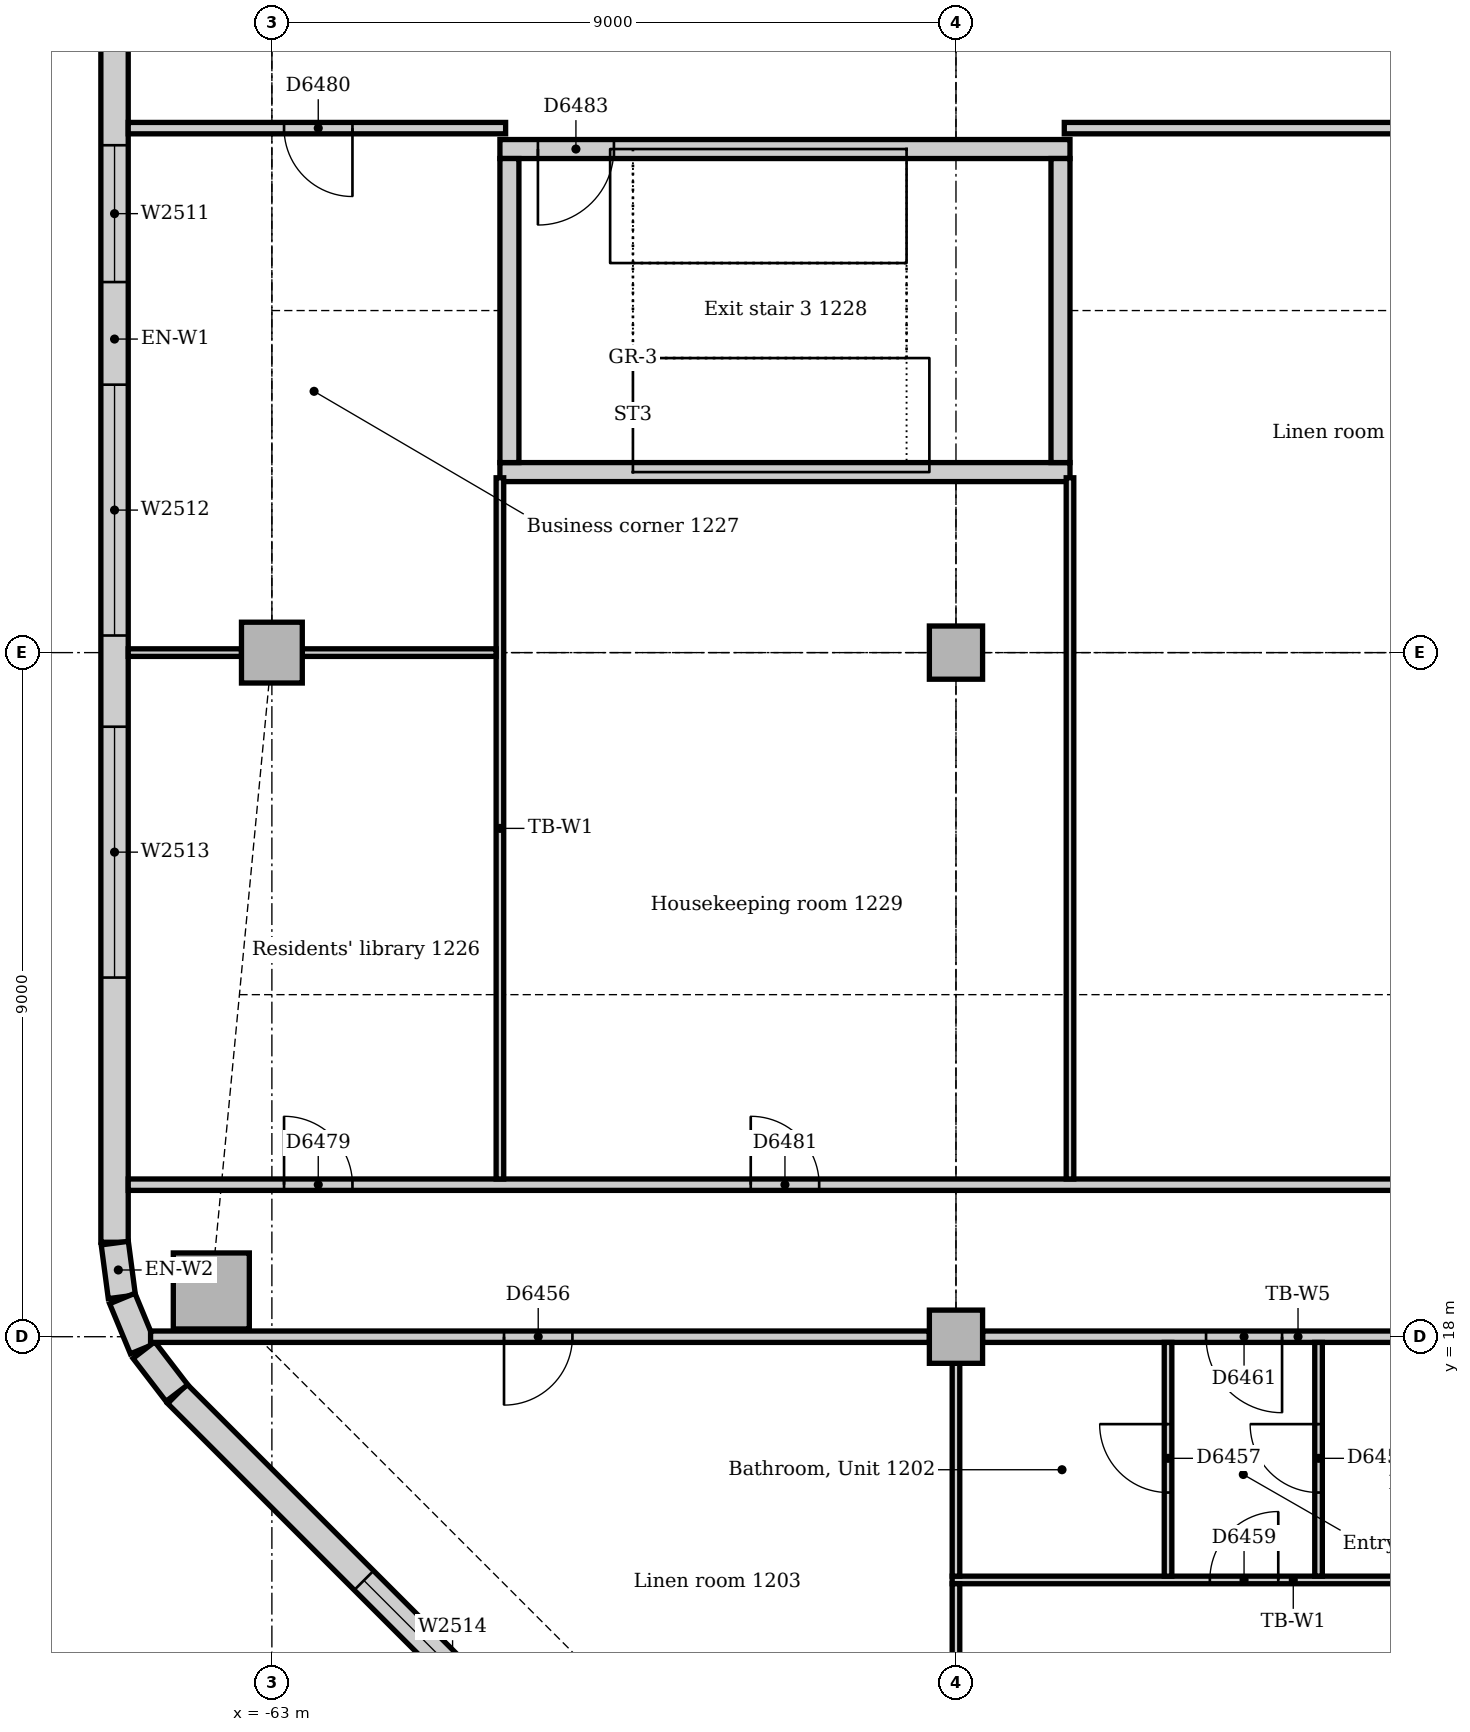
"""IFC4 building model, lengths in metres.
Left out: names, types, materials, properties, quantities, classifications, styles, units other than length and angle.
Written with IfcOpenShell. Run it as: python <this file> out.ifc"""

import sys

from ifc_helpers import new_model, si_unit, direction, frame, frame_2d, origin, origin_2d, place, context, subcontext, project, spatial, rectangle, extrude, element, fill, save


model = new_model("IFC4")
c1 = context("Model", 3, precision=1e-05, world=origin(), true_north=direction((0.0, 1.0)))
c2 = subcontext(c1, "Body", "Model", "MODEL_VIEW")
j1 = project(units=[si_unit("LENGTHUNIT", "METRE"), si_unit("PLANEANGLEUNIT", "RADIAN")], contexts=[c1])
p1 = place(None, origin())
s1 = spatial("IfcSite", under=j1, at=p1, CompositionType="ELEMENT")
p2 = place(p1, origin())
s2 = spatial("IfcBuilding", under=s1, at=p2, CompositionType="ELEMENT")
p3 = place(p2, frame((0.0, 0.0, 55.0)))
s3 = spatial("IfcBuildingStorey", under=s2, at=p3, CompositionType="ELEMENT", Elevation=55.0)
p4 = place(p3, frame((-60.0, 29.375, 0.0), z_axis=(0.0, 0.0, 1.0), x_axis=(1.0, 0.0, 0.0)))
e1 = element("IfcWall", 1, at=p4, inside=s3, PredefinedType="SOLIDWALL", context=c2, shape_type="SweptSolid", body=[
    extrude(rectangle(XDim=7.5, YDim=0.25, at=frame_2d((3.75, 0.0))), origin(), (0.0, 0.0, 1.0), 4.0),
])
p5 = place(p3, frame((-52.5, 33.625, 0.0), z_axis=(0.0, 0.0, 1.0), x_axis=(-1.0, 0.0, 0.0)))
e2 = element("IfcWall", 2, at=p5, inside=s3, PredefinedType="SOLIDWALL", context=c2, shape_type="SweptSolid", body=[
    extrude(rectangle(XDim=7.5, YDim=0.25, at=frame_2d((3.75, 0.0))), origin(), (0.0, 0.0, 1.0), 4.0),
])
p6 = place(p5, frame((6.0, 0.0, 0.0)))
e3 = element("IfcOpeningElement", 3, at=p6, cuts=e2, PredefinedType="OPENING", context=c2, shape_type="SweptSolid", body=[
    extrude(rectangle(XDim=1.0, YDim=2.1, at=frame_2d((0.5, 1.05))), frame((0.0, 0.135, 0.0), z_axis=(0.0, -1.0, 0.0), x_axis=(1.0, 0.0, 0.0)), (0.0, 0.0, 1.0), 0.27),
])
for number, where, z_axis, x_axis in (
    (4, (-52.625, 29.5, 0.0), (0.0, 0.0, 1.0), (0.0, 1.0, 0.0)),
    (5, (-59.875, 33.5, 0.0), (0.0, 0.0, 1.0), (0.0, -1.0, 0.0)),
):
    element("IfcWall", number, at=place(p3, frame(where, z_axis=z_axis, x_axis=x_axis)), inside=s3, PredefinedType="SOLIDWALL", context=c2, shape_type="SweptSolid", body=[
        extrude(rectangle(XDim=4.0, YDim=0.25, at=frame_2d((2.0, 0.0))), origin(), (0.0, 0.0, 1.0), 4.0),
    ])
p7 = place(p3, frame((-63.797, 18.602, 0.0), z_axis=(0.0, 0.0, 1.0), x_axis=(1.0, 0.0, 0.0)))
e6 = element("IfcColumn", 6, at=p7, inside=s3, PredefinedType="COLUMN", context=c2, shape_type="SweptSolid", body=[
    extrude(rectangle(XDim=1.0, YDim=1.0, at=origin_2d()), origin(), (0.0, 0.0, 1.0), 3.85),
])
p8 = place(p3, frame((-63.0, 27.0, 0.0), z_axis=(0.0, 0.0, 1.0), x_axis=(1.0, 0.0, 0.0)))
e7 = element("IfcColumn", 7, at=p8, inside=s3, PredefinedType="COLUMN", context=c2, shape_type="SweptSolid", body=[
    extrude(rectangle(XDim=0.8, YDim=0.8, at=origin_2d()), origin(), (0.0, 0.0, 1.0), 3.85),
])
for number, where, z_axis, x_axis in (
    (8, (-54.0, 18.0, 0.0), (0.0, 0.0, 1.0), (1.0, 0.0, 0.0)),
    (9, (-54.0, 27.0, 0.0), (0.0, 0.0, 1.0), (1.0, 0.0, 0.0)),
):
    element("IfcColumn", number, at=place(p3, frame(where, z_axis=z_axis, x_axis=x_axis)), inside=s3, PredefinedType="COLUMN", context=c2, shape_type="SweptSolid", body=[
        extrude(rectangle(XDim=0.7, YDim=0.7, at=origin_2d()), origin(), (0.0, 0.0, 1.0), 3.85),
    ])
p9 = place(p3, frame((-65.07, 43.007, 0.0), z_axis=(0.0, 0.0, 1.0), x_axis=(0.0, -1.0, 0.0)))
e10 = element("IfcWall", 10, at=p9, inside=s3, PredefinedType="STANDARD", context=c2, shape_type="SweptSolid", body=[
    extrude(rectangle(XDim=23.765, YDim=0.36, at=frame_2d((11.882, 0.0))), origin(), (0.0, 0.0, 1.0), 3.85),
])
p10 = place(p9, frame((4.232, 0.0, 0.9)))
e11 = element("IfcOpeningElement", 11, at=p10, cuts=e10, PredefinedType="OPENING", context=c2, shape_type="SweptSolid", body=[
    extrude(rectangle(XDim=1.8, YDim=1.6, at=frame_2d((0.9, 0.8))), frame((0.0, 0.19, 0.0), z_axis=(0.0, -1.0, 0.0), x_axis=(1.0, 0.0, 0.0)), (0.0, 0.0, 1.0), 0.38),
])
p11 = place(p9, frame((9.332, 0.0, 0.9)))
e12 = element("IfcOpeningElement", 12, at=p11, cuts=e10, PredefinedType="OPENING", context=c2, shape_type="SweptSolid", body=[
    extrude(rectangle(XDim=1.8, YDim=1.6, at=frame_2d((0.9, 0.8))), frame((0.0, 0.19, 0.0), z_axis=(0.0, -1.0, 0.0), x_axis=(1.0, 0.0, 0.0)), (0.0, 0.0, 1.0), 0.38),
])
p12 = place(p9, frame((12.482, 0.0, 0.9)))
e13 = element("IfcOpeningElement", 13, at=p12, cuts=e10, PredefinedType="OPENING", context=c2, shape_type="SweptSolid", body=[
    extrude(rectangle(XDim=3.3, YDim=1.6, at=frame_2d((1.65, 0.8))), frame((0.0, 0.19, 0.0), z_axis=(0.0, -1.0, 0.0), x_axis=(1.0, 0.0, 0.0)), (0.0, 0.0, 1.0), 0.38),
])
p13 = place(p9, frame((16.982, 0.0, 0.9)))
e14 = element("IfcOpeningElement", 14, at=p13, cuts=e10, PredefinedType="OPENING", context=c2, shape_type="SweptSolid", body=[
    extrude(rectangle(XDim=3.3, YDim=1.6, at=frame_2d((1.65, 0.8))), frame((0.0, 0.19, 0.0), z_axis=(0.0, -1.0, 0.0), x_axis=(1.0, 0.0, 0.0)), (0.0, 0.0, 1.0), 0.38),
])
p14 = place(p3, frame((-64.244, 17.249, 0.0), z_axis=(0.0, 0.0, 1.0), x_axis=(0.707106781187, -0.707106781187, 0.0)))
e15 = element("IfcWall", 15, at=p14, inside=s3, PredefinedType="STANDARD", context=c2, shape_type="SweptSolid", body=[
    extrude(rectangle(XDim=10.243, YDim=0.36, at=frame_2d((5.121, 0.0))), origin(), (0.0, 0.0, 1.0), 3.85),
])
p15 = place(p14, frame((3.471, 0.0, 0.9)))
e16 = element("IfcOpeningElement", 16, at=p15, cuts=e15, PredefinedType="OPENING", context=c2, shape_type="SweptSolid", body=[
    extrude(rectangle(XDim=3.3, YDim=1.6, at=frame_2d((1.65, 0.8))), frame((0.0, 0.19, 0.0), z_axis=(0.0, -1.0, 0.0), x_axis=(1.0, 0.0, 0.0)), (0.0, 0.0, 1.0), 0.38),
])
for number, where, z_axis, x_axis in (
    (17, (-65.067, 19.231, 0.0), (0.0, 0.0, 1.0), (0.131, -0.991, 0.0)),
    (18, (-64.968, 18.503, 0.0), (0.0, 0.0, 1.0), (0.383, -0.924, 0.0)),
):
    element("IfcWall", number, at=place(p3, frame(where, z_axis=z_axis, x_axis=x_axis)), inside=s3, PredefinedType="STANDARD", context=c2, shape_type="SweptSolid", body=[
        extrude(rectangle(XDim=0.713, YDim=0.36, at=frame_2d((0.356, 0.0))), origin(), (0.0, 0.0, 1.0), 3.85),
    ])
p16 = place(p3, frame((-64.684, 17.825, 0.0), z_axis=(0.0, 0.0, 1.0), x_axis=(0.608802368033, -0.793321924995, 0.0)))
e19 = element("IfcWall", 19, at=p16, inside=s3, PredefinedType="STANDARD", context=c2, shape_type="SweptSolid", body=[
    extrude(rectangle(XDim=0.713, YDim=0.36, at=frame_2d((0.357, 0.0))), origin(), (0.0, 0.0, 1.0), 3.85),
])
p17 = place(p3, frame((-53.65, 18.0, 0.0), z_axis=(0.0, 0.0, 1.0), x_axis=(1.0, 0.0, 0.0)))
e20 = element("IfcWall", 20, at=p17, inside=s3, PredefinedType="PARTITIONING", context=c2, shape_type="SweptSolid", body=[
    extrude(rectangle(XDim=8.3, YDim=0.15, at=frame_2d((4.15, 0.0))), origin(), (0.0, 0.0, 1.0), 3.158),
])
p18 = place(p17, frame((2.94, 0.0, 0.0)))
e21 = element("IfcOpeningElement", 21, at=p18, cuts=e20, PredefinedType="OPENING", context=c2, shape_type="SweptSolid", body=[
    extrude(rectangle(XDim=1.0, YDim=2.1, at=frame_2d((0.5, 1.05))), frame((0.0, 0.085, 0.0), z_axis=(0.0, -1.0, 0.0), x_axis=(1.0, 0.0, 0.0)), (0.0, 0.0, 1.0), 0.17),
])
p19 = place(p3, frame((-64.596, 18.0, 0.0), z_axis=(0.0, 0.0, 1.0), x_axis=(1.0, 0.0, 0.0)))
e22 = element("IfcWall", 22, at=p19, inside=s3, PredefinedType="PARTITIONING", context=c2, shape_type="SweptSolid", body=[
    extrude(rectangle(XDim=10.246, YDim=0.15, at=frame_2d((5.123, 0.0))), origin(), (0.0, 0.0, 1.0), 3.158),
])
p20 = place(p19, frame((4.65, 0.0, 0.0)))
e23 = element("IfcOpeningElement", 23, at=p20, cuts=e22, PredefinedType="OPENING", context=c2, shape_type="SweptSolid", body=[
    extrude(rectangle(XDim=0.9, YDim=2.1, at=frame_2d((0.45, 1.05))), frame((0.0, 0.085, 0.0), z_axis=(0.0, -1.0, 0.0), x_axis=(1.0, 0.0, 0.0)), (0.0, 0.0, 1.0), 0.17),
])
p21 = place(p3, frame((-64.89, 20.0, 0.0), z_axis=(0.0, 0.0, 1.0), x_axis=(1.0, 0.0, 0.0)))
e24 = element("IfcWall", 24, at=p21, inside=s3, PredefinedType="PARTITIONING", context=c2, shape_type="SweptSolid", body=[
    extrude(rectangle(XDim=19.965, YDim=0.15, at=frame_2d((9.982, 0.0))), origin(), (0.0, 0.0, 1.0), 3.85),
])
p22 = place(p21, frame((2.05, 0.0, 0.0)))
e25 = element("IfcOpeningElement", 25, at=p22, cuts=e24, PredefinedType="OPENING", context=c2, shape_type="SweptSolid", body=[
    extrude(rectangle(XDim=0.9, YDim=2.1, at=frame_2d((0.45, 1.05))), frame((0.0, 0.085, 0.0), z_axis=(0.0, -1.0, 0.0), x_axis=(1.0, 0.0, 0.0)), (0.0, 0.0, 1.0), 0.17),
])
p23 = place(p21, frame((8.19, 0.0, 0.0)))
e26 = element("IfcOpeningElement", 26, at=p23, cuts=e24, PredefinedType="OPENING", context=c2, shape_type="SweptSolid", body=[
    extrude(rectangle(XDim=0.9, YDim=2.1, at=frame_2d((0.45, 1.05))), frame((0.0, 0.085, 0.0), z_axis=(0.0, -1.0, 0.0), x_axis=(1.0, 0.0, 0.0)), (0.0, 0.0, 1.0), 0.17),
])
p24 = place(p3, frame((-52.575, 33.9, 0.0), z_axis=(0.0, 0.0, 1.0), x_axis=(1.0, 0.0, 0.0)))
e27 = element("IfcWall", 27, at=p24, inside=s3, PredefinedType="PARTITIONING", context=c2, shape_type="SweptSolid", body=[
    extrude(rectangle(XDim=7.5, YDim=0.15, at=frame_2d((3.75, 0.0))), origin(), (0.0, 0.0, 1.0), 3.85),
])
p25 = place(p3, frame((-64.89, 33.9, 0.0), z_axis=(0.0, 0.0, 1.0), x_axis=(1.0, 0.0, 0.0)))
e28 = element("IfcWall", 28, at=p25, inside=s3, PredefinedType="PARTITIONING", context=c2, shape_type="SweptSolid", body=[
    extrude(rectangle(XDim=4.965, YDim=0.15, at=frame_2d((2.482, 0.0))), origin(), (0.0, 0.0, 1.0), 3.85),
])
p26 = place(p25, frame((2.05, 0.0, 0.0)))
e29 = element("IfcOpeningElement", 29, at=p26, cuts=e28, PredefinedType="OPENING", context=c2, shape_type="SweptSolid", body=[
    extrude(rectangle(XDim=0.9, YDim=2.1, at=frame_2d((0.45, 1.05))), frame((0.0, 0.085, 0.0), z_axis=(0.0, -1.0, 0.0), x_axis=(1.0, 0.0, 0.0)), (0.0, 0.0, 1.0), 0.17),
])
p27 = place(p3, frame((-54.05, 14.8, 0.0), z_axis=(0.0, 0.0, 1.0), x_axis=(1.0, 0.0, 0.0)))
e30 = element("IfcWall", 30, at=p27, inside=s3, PredefinedType="PARTITIONING", context=c2, shape_type="SweptSolid", body=[
    extrude(rectangle(XDim=8.975, YDim=0.1, at=frame_2d((4.487, 0.0))), origin(), (0.0, 0.0, 1.0), 3.85),
])
p28 = place(p27, frame((3.39, 0.0, 0.0)))
e31 = element("IfcOpeningElement", 31, at=p28, cuts=e30, PredefinedType="OPENING", context=c2, shape_type="SweptSolid", body=[
    extrude(rectangle(XDim=0.9, YDim=2.1, at=frame_2d((0.45, 1.05))), frame((0.0, 0.06, 0.0), z_axis=(0.0, -1.0, 0.0), x_axis=(1.0, 0.0, 0.0)), (0.0, 0.0, 1.0), 0.12),
])
for number, where, z_axis, x_axis in (
    (32, (-60.0, 20.075, 0.0), (0.0, 0.0, 1.0), (0.0, 1.0, 0.0)),
    (33, (-52.5, 20.075, 0.0), (0.0, 0.0, 1.0), (0.0, 1.0, 0.0)),
):
    element("IfcWall", number, at=place(p3, frame(where, z_axis=z_axis, x_axis=x_axis)), inside=s3, PredefinedType="PARTITIONING", context=c2, shape_type="SweptSolid", body=[
        extrude(rectangle(XDim=9.225, YDim=0.1, at=frame_2d((4.612, 0.0))), origin(), (0.0, 0.0, 1.0), 3.85),
    ])
p29 = place(p3, frame((-54.0, 9.36, 0.0), z_axis=(0.0, 0.0, 1.0), x_axis=(0.0, 1.0, 0.0)))
e34 = element("IfcWall", 34, at=p29, inside=s3, PredefinedType="PARTITIONING", context=c2, shape_type="SweptSolid", body=[
    extrude(rectangle(XDim=5.39, YDim=0.1, at=frame_2d((2.695, 0.0))), origin(), (0.0, 0.0, 1.0), 3.256),
])
p30 = place(p3, frame((-54.0, 14.85, 0.0), z_axis=(0.0, 0.0, 1.0), x_axis=(0.0, 1.0, 0.0)))
e35 = element("IfcWall", 35, at=p30, inside=s3, PredefinedType="PARTITIONING", context=c2, shape_type="SweptSolid", body=[
    extrude(rectangle(XDim=2.8, YDim=0.1, at=frame_2d((1.4, 0.0))), origin(), (0.0, 0.0, 1.0), 3.256),
])
p31 = place(p3, frame((-62.6, 27.0, 0.0), z_axis=(0.0, 0.0, 1.0), x_axis=(1.0, 0.0, 0.0)))
e36 = element("IfcWall", 36, at=p31, inside=s3, PredefinedType="PARTITIONING", context=c2, shape_type="SweptSolid", body=[
    extrude(rectangle(XDim=2.55, YDim=0.1, at=frame_2d((1.275, 0.0))), origin(), (0.0, 0.0, 1.0), 3.158),
])
p32 = place(p3, frame((-64.89, 27.0, 0.0), z_axis=(0.0, 0.0, 1.0), x_axis=(1.0, 0.0, 0.0)))
e37 = element("IfcWall", 37, at=p32, inside=s3, PredefinedType="PARTITIONING", context=c2, shape_type="SweptSolid", body=[
    extrude(rectangle(XDim=1.49, YDim=0.1, at=frame_2d((0.745, 0.0))), origin(), (0.0, 0.0, 1.0), 3.85),
])
p33 = place(p3, frame((-51.21, 14.85, 0.0), z_axis=(0.0, 0.0, 1.0), x_axis=(0.0, 1.0, 0.0)))
e38 = element("IfcWall", 38, at=p33, inside=s3, PredefinedType="PARTITIONING", context=c2, shape_type="SweptSolid", body=[
    extrude(rectangle(XDim=3.075, YDim=0.1, at=frame_2d((1.538, 0.0))), origin(), (0.0, 0.0, 1.0), 3.85),
])
p34 = place(p33, frame((1.1, 0.0, 0.0)))
e39 = element("IfcOpeningElement", 39, at=p34, cuts=e38, PredefinedType="OPENING", context=c2, shape_type="SweptSolid", body=[
    extrude(rectangle(XDim=0.9, YDim=2.1, at=frame_2d((0.45, 1.05))), frame((0.0, 0.06, 0.0), z_axis=(0.0, -1.0, 0.0), x_axis=(1.0, 0.0, 0.0)), (0.0, 0.0, 1.0), 0.12),
])
p35 = place(p3, frame((-49.23, 14.85, 0.0), z_axis=(0.0, 0.0, 1.0), x_axis=(0.0, 1.0, 0.0)))
e40 = element("IfcWall", 40, at=p35, inside=s3, PredefinedType="PARTITIONING", context=c2, shape_type="SweptSolid", body=[
    extrude(rectangle(XDim=3.075, YDim=0.1, at=frame_2d((1.538, 0.0))), origin(), (0.0, 0.0, 1.0), 3.85),
])
p36 = place(p35, frame((1.1, 0.0, 0.0)))
e41 = element("IfcOpeningElement", 41, at=p36, cuts=e40, PredefinedType="OPENING", context=c2, shape_type="SweptSolid", body=[
    extrude(rectangle(XDim=0.9, YDim=2.1, at=frame_2d((0.45, 1.05))), frame((0.0, 0.06, 0.0), z_axis=(0.0, -1.0, 0.0), x_axis=(1.0, 0.0, 0.0)), (0.0, 0.0, 1.0), 0.12),
])
p37 = place(p11, origin())
e42 = element("IfcWindow", 42, at=p37, inside=s3, PartitioningType="SINGLE_PANEL", PredefinedType="WINDOW", context=c2, shape_type="SweptSolid", body=[
    extrude(rectangle(XDim=1.8, YDim=1.6, at=frame_2d((0.9, 0.8))), frame((0.0, 0.13, 0.0), z_axis=(0.0, -1.0, 0.0), x_axis=(1.0, 0.0, 0.0)), (0.0, 0.0, 1.0), 0.06),
])
fill(e12, e42)
p38 = place(p12, origin())
e43 = element("IfcWindow", 43, at=p38, inside=s3, PartitioningType="SINGLE_PANEL", PredefinedType="WINDOW", context=c2, shape_type="SweptSolid", body=[
    extrude(rectangle(XDim=3.3, YDim=1.6, at=frame_2d((1.65, 0.8))), frame((0.0, 0.13, 0.0), z_axis=(0.0, -1.0, 0.0), x_axis=(1.0, 0.0, 0.0)), (0.0, 0.0, 1.0), 0.06),
])
fill(e13, e43)
p39 = place(p13, origin())
e44 = element("IfcWindow", 44, at=p39, inside=s3, PartitioningType="SINGLE_PANEL", PredefinedType="WINDOW", context=c2, shape_type="SweptSolid", body=[
    extrude(rectangle(XDim=3.3, YDim=1.6, at=frame_2d((1.65, 0.8))), frame((0.0, 0.13, 0.0), z_axis=(0.0, -1.0, 0.0), x_axis=(1.0, 0.0, 0.0)), (0.0, 0.0, 1.0), 0.06),
])
fill(e14, e44)
p40 = place(p15, origin())
e45 = element("IfcWindow", 45, at=p40, inside=s3, PartitioningType="SINGLE_PANEL", PredefinedType="WINDOW", context=c2, shape_type="SweptSolid", body=[
    extrude(rectangle(XDim=3.3, YDim=1.6, at=frame_2d((1.65, 0.8))), frame((0.0, 0.13, 0.0), z_axis=(0.0, -1.0, 0.0), x_axis=(1.0, 0.0, 0.0)), (0.0, 0.0, 1.0), 0.06),
])
fill(e16, e45)
p41 = place(p20, frame((0.9, 0.0, 0.0), z_axis=(0.0, 0.0, 1.0), x_axis=(-1.0, 0.0, 0.0)))
e46 = element("IfcDoor", 46, at=p41, inside=s3, OperationType="SINGLE_SWING_RIGHT", PredefinedType="DOOR", context=c2, shape_type="SweptSolid", body=[
    extrude(rectangle(XDim=0.9, YDim=2.1, at=frame_2d((0.45, 1.05))), frame((0.0, 0.025, 0.0), z_axis=(0.0, -1.0, 0.0), x_axis=(1.0, 0.0, 0.0)), (0.0, 0.0, 1.0), 0.05),
])
fill(e23, e46)
p42 = place(p34, origin())
e47 = element("IfcDoor", 47, at=p42, inside=s3, OperationType="SINGLE_SWING_RIGHT", PredefinedType="DOOR", context=c2, shape_type="SweptSolid", body=[
    extrude(rectangle(XDim=0.9, YDim=2.1, at=frame_2d((0.45, 1.05))), frame((0.0, 0.025, 0.0), z_axis=(0.0, -1.0, 0.0), x_axis=(1.0, 0.0, 0.0)), (0.0, 0.0, 1.0), 0.05),
])
fill(e39, e47)
p43 = place(p36, origin())
e48 = element("IfcDoor", 48, at=p43, inside=s3, OperationType="SINGLE_SWING_RIGHT", PredefinedType="DOOR", context=c2, shape_type="SweptSolid", body=[
    extrude(rectangle(XDim=0.9, YDim=2.1, at=frame_2d((0.45, 1.05))), frame((0.0, 0.025, 0.0), z_axis=(0.0, -1.0, 0.0), x_axis=(1.0, 0.0, 0.0)), (0.0, 0.0, 1.0), 0.05),
])
fill(e41, e48)
p44 = place(p28, origin())
e49 = element("IfcDoor", 49, at=p44, inside=s3, OperationType="SINGLE_SWING_RIGHT", PredefinedType="DOOR", context=c2, shape_type="SweptSolid", body=[
    extrude(rectangle(XDim=0.9, YDim=2.1, at=frame_2d((0.45, 1.05))), frame((0.0, 0.025, 0.0), z_axis=(0.0, -1.0, 0.0), x_axis=(1.0, 0.0, 0.0)), (0.0, 0.0, 1.0), 0.05),
])
fill(e31, e49)
p45 = place(p18, frame((1.0, 0.0, 0.0), z_axis=(0.0, 0.0, 1.0), x_axis=(-1.0, 0.0, 0.0)))
e50 = element("IfcDoor", 50, at=p45, inside=s3, OperationType="SINGLE_SWING_LEFT", PredefinedType="DOOR", context=c2, shape_type="SweptSolid", body=[
    extrude(rectangle(XDim=1.0, YDim=2.1, at=frame_2d((0.5, 1.05))), frame((0.0, 0.025, 0.0), z_axis=(0.0, -1.0, 0.0), x_axis=(1.0, 0.0, 0.0)), (0.0, 0.0, 1.0), 0.05),
])
fill(e21, e50)
p46 = place(p22, origin())
e51 = element("IfcDoor", 51, at=p46, inside=s3, OperationType="SINGLE_SWING_LEFT", PredefinedType="DOOR", context=c2, shape_type="SweptSolid", body=[
    extrude(rectangle(XDim=0.9, YDim=2.1, at=frame_2d((0.45, 1.05))), frame((0.0, 0.025, 0.0), z_axis=(0.0, -1.0, 0.0), x_axis=(1.0, 0.0, 0.0)), (0.0, 0.0, 1.0), 0.05),
])
fill(e25, e51)
p47 = place(p26, frame((0.9, 0.0, 0.0), z_axis=(0.0, 0.0, 1.0), x_axis=(-1.0, 0.0, 0.0)))
e52 = element("IfcDoor", 52, at=p47, inside=s3, OperationType="SINGLE_SWING_LEFT", PredefinedType="DOOR", context=c2, shape_type="SweptSolid", body=[
    extrude(rectangle(XDim=0.9, YDim=2.1, at=frame_2d((0.45, 1.05))), frame((0.0, 0.025, 0.0), z_axis=(0.0, -1.0, 0.0), x_axis=(1.0, 0.0, 0.0)), (0.0, 0.0, 1.0), 0.05),
])
fill(e29, e52)
p48 = place(p23, origin())
e53 = element("IfcDoor", 53, at=p48, inside=s3, OperationType="SINGLE_SWING_LEFT", PredefinedType="DOOR", context=c2, shape_type="SweptSolid", body=[
    extrude(rectangle(XDim=0.9, YDim=2.1, at=frame_2d((0.45, 1.05))), frame((0.0, 0.025, 0.0), z_axis=(0.0, -1.0, 0.0), x_axis=(1.0, 0.0, 0.0)), (0.0, 0.0, 1.0), 0.05),
])
fill(e26, e53)
p49 = place(p6, origin())
e54 = element("IfcDoor", 54, at=p49, inside=s3, OperationType="SINGLE_SWING_RIGHT", PredefinedType="DOOR", context=c2, shape_type="SweptSolid", body=[
    extrude(rectangle(XDim=1.0, YDim=2.1, at=frame_2d((0.5, 1.05))), frame((0.0, 0.025, 0.0), z_axis=(0.0, -1.0, 0.0), x_axis=(1.0, 0.0, 0.0)), (0.0, 0.0, 1.0), 0.05),
])
fill(e3, e54)
save(model, sys.argv[1])
